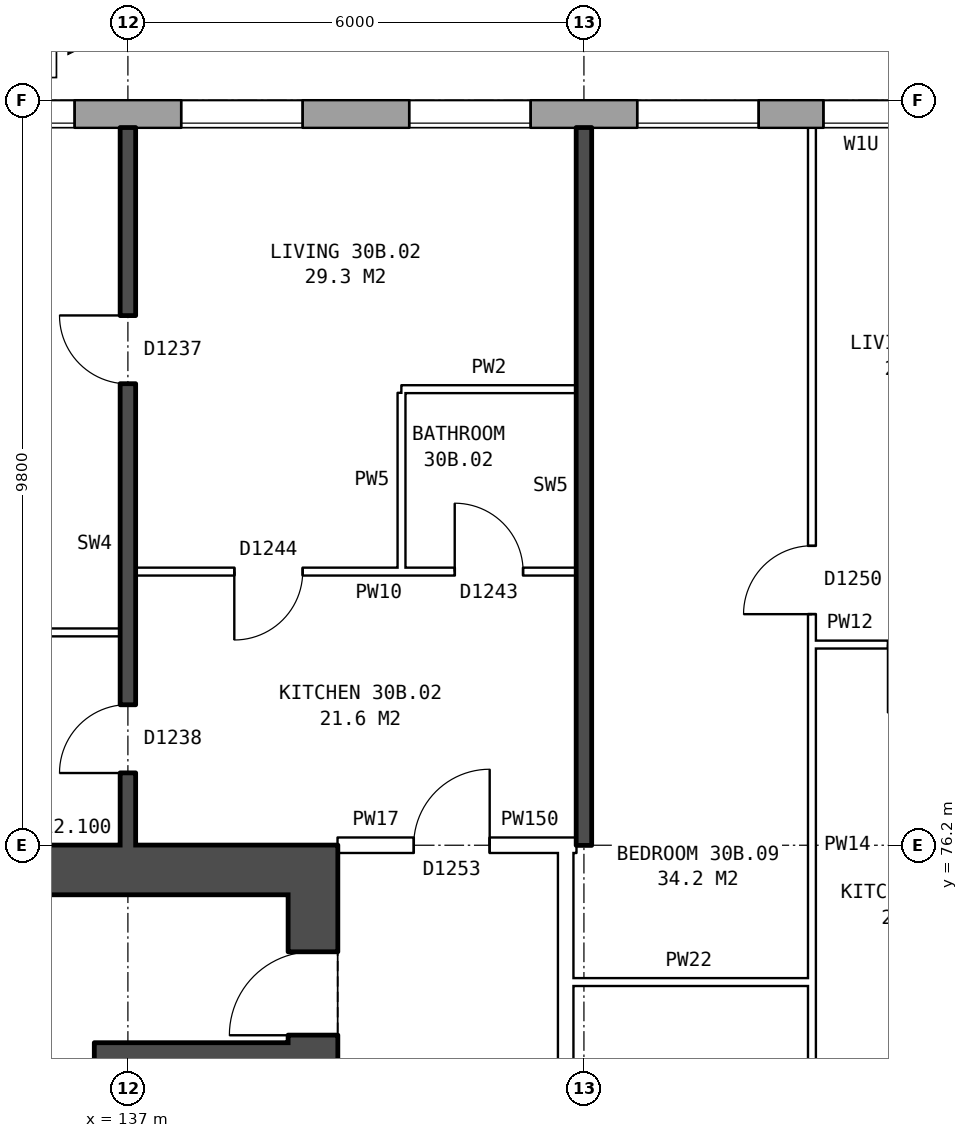
"""IFC4 building model, lengths in metres.
Left out: names, types, materials, properties, quantities, classifications, styles, units other than length and angle.
Written with IfcOpenShell. Run it as: python <this file> out.ifc"""

import sys

from ifc_helpers import new_model, si_unit, direction, frame, frame_2d, origin, place, context, subcontext, project, spatial, rectangle, extrude, element, fill, save


model = new_model("IFC4")
c1 = context("Model", 3, precision=1e-05, world=origin(), true_north=direction((0.0, 1.0)))
c2 = subcontext(c1, "Body", "Model", "MODEL_VIEW")
j1 = project(units=[si_unit("LENGTHUNIT", "METRE"), si_unit("PLANEANGLEUNIT", "RADIAN")], contexts=[c1])
p1 = place(None, origin())
s1 = spatial("IfcSite", under=j1, at=p1, CompositionType="ELEMENT")
p2 = place(p1, origin())
s2 = spatial("IfcBuilding", under=s1, at=p2, CompositionType="ELEMENT")
p3 = place(p2, frame((0.0, 0.0, 108.8)))
s3 = spatial("IfcBuildingStorey", under=s2, at=p3, CompositionType="ELEMENT", Elevation=108.8)
p4 = place(p3, frame((170.925, 85.82, 0.0), z_axis=(0.0, 0.0, 1.0), x_axis=(-1.0, 0.0, 0.0)))
e1 = element("IfcWall", 1, at=p4, inside=s3, PredefinedType="STANDARD", context=c2, shape_type="SweptSolid", body=[
    extrude(rectangle(XDim=36.851, YDim=0.36, at=frame_2d((18.425, 0.0))), origin(), (0.0, 0.0, 1.0), 2.85),
])
p5 = place(p4, frame((1.625, 0.0, 0.8)))
e2 = element("IfcOpeningElement", 2, at=p5, cuts=e1, PredefinedType="OPENING", context=c2, shape_type="SweptSolid", body=[
    extrude(rectangle(XDim=1.6, YDim=1.8, at=frame_2d((0.8, 0.9))), frame((0.0, 0.19, 0.0), z_axis=(0.0, -1.0, 0.0), x_axis=(1.0, 0.0, 0.0)), (0.0, 0.0, 1.0), 0.38),
])
p6 = place(p4, frame((4.625, 0.0, 0.8)))
e3 = element("IfcOpeningElement", 3, at=p6, cuts=e1, PredefinedType="OPENING", context=c2, shape_type="SweptSolid", body=[
    extrude(rectangle(XDim=1.6, YDim=1.8, at=frame_2d((0.8, 0.9))), frame((0.0, 0.19, 0.0), z_axis=(0.0, -1.0, 0.0), x_axis=(1.0, 0.0, 0.0)), (0.0, 0.0, 1.0), 0.38),
])
p7 = place(p4, frame((7.625, 0.0, 0.8)))
e4 = element("IfcOpeningElement", 4, at=p7, cuts=e1, PredefinedType="OPENING", context=c2, shape_type="SweptSolid", body=[
    extrude(rectangle(XDim=1.6, YDim=1.8, at=frame_2d((0.8, 0.9))), frame((0.0, 0.19, 0.0), z_axis=(0.0, -1.0, 0.0), x_axis=(1.0, 0.0, 0.0)), (0.0, 0.0, 1.0), 0.38),
])
p8 = place(p4, frame((10.625, 0.0, 0.8)))
e5 = element("IfcOpeningElement", 5, at=p8, cuts=e1, PredefinedType="OPENING", context=c2, shape_type="SweptSolid", body=[
    extrude(rectangle(XDim=1.6, YDim=1.8, at=frame_2d((0.8, 0.9))), frame((0.0, 0.19, 0.0), z_axis=(0.0, -1.0, 0.0), x_axis=(1.0, 0.0, 0.0)), (0.0, 0.0, 1.0), 0.38),
])
p9 = place(p4, frame((12.525, 0.0, 1.7)))
e6 = element("IfcOpeningElement", 6, at=p9, cuts=e1, PredefinedType="OPENING", context=c2, shape_type="SweptSolid", body=[
    extrude(rectangle(XDim=0.6, YDim=0.9, at=frame_2d((0.3, 0.45))), frame((0.0, 0.19, 0.0), z_axis=(0.0, -1.0, 0.0), x_axis=(1.0, 0.0, 0.0)), (0.0, 0.0, 1.0), 0.38),
])
p10 = place(p4, frame((16.625, 0.0, 0.8)))
e7 = element("IfcOpeningElement", 7, at=p10, cuts=e1, PredefinedType="OPENING", context=c2, shape_type="SweptSolid", body=[
    extrude(rectangle(XDim=1.6, YDim=1.8, at=frame_2d((0.8, 0.9))), frame((0.0, 0.19, 0.0), z_axis=(0.0, -1.0, 0.0), x_axis=(1.0, 0.0, 0.0)), (0.0, 0.0, 1.0), 0.38),
])
p11 = place(p4, frame((19.625, 0.0, 0.8)))
e8 = element("IfcOpeningElement", 8, at=p11, cuts=e1, PredefinedType="OPENING", context=c2, shape_type="SweptSolid", body=[
    extrude(rectangle(XDim=1.6, YDim=1.8, at=frame_2d((0.8, 0.9))), frame((0.0, 0.19, 0.0), z_axis=(0.0, -1.0, 0.0), x_axis=(1.0, 0.0, 0.0)), (0.0, 0.0, 1.0), 0.38),
])
p12 = place(p4, frame((22.125, 0.0, 0.15)))
e9 = element("IfcOpeningElement", 9, at=p12, cuts=e1, PredefinedType="OPENING", context=c2, shape_type="SweptSolid", body=[
    extrude(rectangle(XDim=1.2, YDim=0.9, at=frame_2d((0.6, 0.45))), frame((0.0, 0.19, 0.0), z_axis=(0.0, -1.0, 0.0), x_axis=(1.0, 0.0, 0.0)), (0.0, 0.0, 1.0), 0.38),
])
p13 = place(p4, frame((25.625, 0.0, 0.8)))
e10 = element("IfcOpeningElement", 10, at=p13, cuts=e1, PredefinedType="OPENING", context=c2, shape_type="SweptSolid", body=[
    extrude(rectangle(XDim=1.6, YDim=1.8, at=frame_2d((0.8, 0.9))), frame((0.0, 0.19, 0.0), z_axis=(0.0, -1.0, 0.0), x_axis=(1.0, 0.0, 0.0)), (0.0, 0.0, 1.0), 0.38),
])
p14 = place(p4, frame((28.625, 0.0, 0.8)))
e11 = element("IfcOpeningElement", 11, at=p14, cuts=e1, PredefinedType="OPENING", context=c2, shape_type="SweptSolid", body=[
    extrude(rectangle(XDim=1.6, YDim=1.8, at=frame_2d((0.8, 0.9))), frame((0.0, 0.19, 0.0), z_axis=(0.0, -1.0, 0.0), x_axis=(1.0, 0.0, 0.0)), (0.0, 0.0, 1.0), 0.38),
])
p15 = place(p4, frame((31.625, 0.0, 0.8)))
e12 = element("IfcOpeningElement", 12, at=p15, cuts=e1, PredefinedType="OPENING", context=c2, shape_type="SweptSolid", body=[
    extrude(rectangle(XDim=1.6, YDim=1.8, at=frame_2d((0.8, 0.9))), frame((0.0, 0.19, 0.0), z_axis=(0.0, -1.0, 0.0), x_axis=(1.0, 0.0, 0.0)), (0.0, 0.0, 1.0), 0.38),
])
p16 = place(p4, frame((34.625, 0.0, 0.8)))
e13 = element("IfcOpeningElement", 13, at=p16, cuts=e1, PredefinedType="OPENING", context=c2, shape_type="SweptSolid", body=[
    extrude(rectangle(XDim=1.6, YDim=1.8, at=frame_2d((0.8, 0.9))), frame((0.0, 0.19, 0.0), z_axis=(0.0, -1.0, 0.0), x_axis=(1.0, 0.0, 0.0)), (0.0, 0.0, 1.0), 0.38),
])
p17 = place(p4, frame((14.275, 0.0, 0.8)))
e14 = element("IfcOpeningElement", 14, at=p17, cuts=e1, PredefinedType="OPENING", context=c2, shape_type="SweptSolid", body=[
    extrude(rectangle(XDim=1.4, YDim=0.9, at=frame_2d((0.7, 0.45))), frame((0.0, 0.19, 0.0), z_axis=(0.0, -1.0, 0.0), x_axis=(1.0, 0.0, 0.0)), (0.0, 0.0, 1.0), 0.38),
])
p18 = place(p4, frame((23.775, 0.0, 1.65)))
e15 = element("IfcOpeningElement", 15, at=p18, cuts=e1, PredefinedType="OPENING", context=c2, shape_type="SweptSolid", body=[
    extrude(rectangle(XDim=1.0, YDim=0.9, at=frame_2d((0.5, 0.45))), frame((0.0, 0.19, 0.0), z_axis=(0.0, -1.0, 0.0), x_axis=(1.0, 0.0, 0.0)), (0.0, 0.0, 1.0), 0.38),
])
p19 = place(p3, frame((139.435, 64.45, 0.0), z_axis=(0.0, 0.0, 1.0), x_axis=(0.0, 1.0, 0.0)))
e16 = element("IfcWall", 16, at=p19, inside=s3, PredefinedType="SHEAR", context=c2, shape_type="SweptSolid", body=[
    extrude(rectangle(XDim=11.1, YDim=0.65, at=frame_2d((5.55, 0.0))), origin(), (0.0, 0.0, 1.0), 2.85),
])
p20 = place(p19, frame((0.675, 0.0, 0.0)))
e17 = element("IfcOpeningElement", 17, at=p20, cuts=e16, PredefinedType="OPENING", context=c2, shape_type="SweptSolid", body=[
    extrude(rectangle(XDim=1.1, YDim=2.1, at=frame_2d((0.55, 1.05))), frame((0.0, 0.335, 0.0), z_axis=(0.0, -1.0, 0.0), x_axis=(1.0, 0.0, 0.0)), (0.0, 0.0, 1.0), 0.67),
])
p21 = place(p19, frame((9.25, 0.0, 0.0)))
e18 = element("IfcOpeningElement", 18, at=p21, cuts=e16, PredefinedType="OPENING", context=c2, shape_type="SweptSolid", body=[
    extrude(rectangle(XDim=1.1, YDim=2.1, at=frame_2d((0.55, 1.05))), frame((0.0, 0.335, 0.0), z_axis=(0.0, -1.0, 0.0), x_axis=(1.0, 0.0, 0.0)), (0.0, 0.0, 1.0), 0.67),
])
p22 = place(p19, frame((7.475, 0.0, 0.0)))
e19 = element("IfcOpeningElement", 19, at=p22, cuts=e16, PredefinedType="OPENING", context=c2, shape_type="SweptSolid", body=[
    extrude(rectangle(XDim=0.85, YDim=2.1, at=frame_2d((0.425, 1.05))), frame((0.0, 0.335, 0.0), z_axis=(0.0, -1.0, 0.0), x_axis=(1.0, 0.0, 0.0)), (0.0, 0.0, 1.0), 0.67),
])
p23 = place(p3, frame((139.76, 75.875, 0.0), z_axis=(0.0, 0.0, 1.0), x_axis=(-1.0, 0.0, 0.0)))
e20 = element("IfcWall", 20, at=p23, inside=s3, PredefinedType="SHEAR", context=c2, shape_type="SweptSolid", body=[
    extrude(rectangle(XDim=8.4, YDim=0.65, at=frame_2d((4.2, 0.0))), origin(), (0.0, 0.0, 1.0), 2.85),
])
p24 = place(p3, frame((139.11, 73.45, 0.0), z_axis=(0.0, 0.0, 1.0), x_axis=(-1.0, 0.0, 0.0)))
e21 = element("IfcWall", 21, at=p24, inside=s3, PredefinedType="SHEAR", context=c2, shape_type="SweptSolid", body=[
    extrude(rectangle(XDim=2.25, YDim=0.3, at=frame_2d((1.125, 0.0))), origin(), (0.0, 0.0, 1.0), 2.85),
])
p25 = place(p3, frame((136.71, 71.4, 0.0), z_axis=(0.0, 0.0, 1.0), x_axis=(0.0, 1.0, 0.0)))
e22 = element("IfcWall", 22, at=p25, inside=s3, PredefinedType="SHEAR", context=c2, shape_type="SweptSolid", body=[
    extrude(rectangle(XDim=2.2, YDim=0.3, at=frame_2d((1.1, 0.0))), origin(), (0.0, 0.0, 1.0), 2.85),
])
p26 = place(p3, frame((142.76, 63.9, 0.0), z_axis=(0.0, 0.0, 1.0), x_axis=(0.0, 1.0, 0.0)))
e23 = element("IfcWall", 23, at=p26, inside=s3, PredefinedType="PARTITIONING", context=c2, shape_type="SweptSolid", body=[
    extrude(rectangle(XDim=12.2, YDim=0.2, at=frame_2d((6.1, 0.0))), origin(), (0.0, 0.0, 1.0), 2.85),
])
p27 = place(p26, frame((5.1, 0.0, 0.0)))
e24 = element("IfcOpeningElement", 24, at=p27, cuts=e23, PredefinedType="OPENING", context=c2, shape_type="SweptSolid", body=[
    extrude(rectangle(XDim=2.0, YDim=2.1, at=frame_2d((1.0, 1.05))), frame((0.0, 0.11, 0.0), z_axis=(0.0, -1.0, 0.0), x_axis=(1.0, 0.0, 0.0)), (0.0, 0.0, 1.0), 0.22),
])
p28 = place(p3, frame((142.76, 74.4, 0.0), z_axis=(0.0, 0.0, 1.0), x_axis=(1.0, 0.0, 0.0)))
e25 = element("IfcWall", 25, at=p28, inside=s3, PredefinedType="PARTITIONING", context=c2, shape_type="SweptSolid", body=[
    extrude(rectangle(XDim=3.24, YDim=0.1, at=frame_2d((1.62, 0.0))), origin(), (0.0, 0.0, 1.0), 2.85),
])
p29 = place(p3, frame((139.76, 76.2, 0.0), z_axis=(0.0, 0.0, 1.0), x_axis=(1.0, 0.0, 0.0)))
e26 = element("IfcWall", 26, at=p29, inside=s3, PredefinedType="PARTITIONING", context=c2, shape_type="SweptSolid", body=[
    extrude(rectangle(XDim=3.0, YDim=0.2, at=frame_2d((1.5, 0.0))), origin(), (0.0, 0.0, 1.0), 2.85),
])
p30 = place(p29, frame((1.0, 0.0, 0.0)))
e27 = element("IfcOpeningElement", 27, at=p30, cuts=e26, PredefinedType="OPENING", context=c2, shape_type="SweptSolid", body=[
    extrude(rectangle(XDim=1.0, YDim=2.1, at=frame_2d((0.5, 1.05))), frame((0.0, 0.11, 0.0), z_axis=(0.0, -1.0, 0.0), x_axis=(1.0, 0.0, 0.0)), (0.0, 0.0, 1.0), 0.22),
])
p31 = place(p3, frame((142.76, 76.2, 0.0), z_axis=(0.0, 0.0, 1.0), x_axis=(1.0, 0.0, 0.0)))
e28 = element("IfcWall", 28, at=p31, inside=s3, PredefinedType="PARTITIONING", context=c2, shape_type="SweptSolid", body=[
    extrude(rectangle(XDim=0.14, YDim=0.2, at=frame_2d((0.07, 0.0))), origin(), (0.0, 0.0, 1.0), 2.85),
])
p32 = place(p3, frame((146.0, 78.84, 0.0), z_axis=(0.0, 0.0, 1.0), x_axis=(1.0, 0.0, 0.0)))
e29 = element("IfcWall", 29, at=p32, inside=s3, PredefinedType="PARTITIONING", context=c2, shape_type="SweptSolid", body=[
    extrude(rectangle(XDim=2.9, YDim=0.1, at=frame_2d((1.45, 0.0))), origin(), (0.0, 0.0, 1.0), 2.85),
])
p33 = place(p32, frame((1.0, 0.0, 0.0)))
e30 = element("IfcOpeningElement", 30, at=p33, cuts=e29, PredefinedType="OPENING", context=c2, shape_type="SweptSolid", body=[
    extrude(rectangle(XDim=0.9, YDim=2.1, at=frame_2d((0.45, 1.05))), frame((0.0, 0.06, 0.0), z_axis=(0.0, -1.0, 0.0), x_axis=(1.0, 0.0, 0.0)), (0.0, 0.0, 1.0), 0.12),
])
p34 = place(p3, frame((131.36, 79.0, 0.0), z_axis=(0.0, 0.0, 1.0), x_axis=(1.0, 0.0, 0.0)))
e31 = element("IfcWall", 31, at=p34, inside=s3, PredefinedType="PARTITIONING", context=c2, shape_type="SweptSolid", body=[
    extrude(rectangle(XDim=5.54, YDim=0.1, at=frame_2d((2.77, 0.0))), origin(), (0.0, 0.0, 1.0), 2.85),
])
p35 = place(p3, frame((137.1, 79.8, 0.0), z_axis=(0.0, 0.0, 1.0), x_axis=(1.0, 0.0, 0.0)))
e32 = element("IfcWall", 32, at=p35, inside=s3, PredefinedType="PARTITIONING", context=c2, shape_type="SweptSolid", body=[
    extrude(rectangle(XDim=5.8, YDim=0.1, at=frame_2d((2.9, 0.0))), origin(), (0.0, 0.0, 1.0), 2.85),
])
p36 = place(p35, frame((1.3, 0.0, 0.0)))
e33 = element("IfcOpeningElement", 33, at=p36, cuts=e32, PredefinedType="OPENING", context=c2, shape_type="SweptSolid", body=[
    extrude(rectangle(XDim=0.9, YDim=2.1, at=frame_2d((0.45, 1.05))), frame((0.0, 0.06, 0.0), z_axis=(0.0, -1.0, 0.0), x_axis=(1.0, 0.0, 0.0)), (0.0, 0.0, 1.0), 0.12),
])
p37 = place(p35, frame((4.2, 0.0, 0.0)))
e34 = element("IfcOpeningElement", 34, at=p37, cuts=e32, PredefinedType="OPENING", context=c2, shape_type="SweptSolid", body=[
    extrude(rectangle(XDim=0.9, YDim=2.1, at=frame_2d((0.45, 1.05))), frame((0.0, 0.06, 0.0), z_axis=(0.0, -1.0, 0.0), x_axis=(1.0, 0.0, 0.0)), (0.0, 0.0, 1.0), 0.12),
])
p38 = place(p3, frame((140.6, 82.2, 0.0), z_axis=(0.0, 0.0, 1.0), x_axis=(1.0, 0.0, 0.0)))
e35 = element("IfcWall", 35, at=p38, inside=s3, PredefinedType="PARTITIONING", context=c2, shape_type="SweptSolid", body=[
    extrude(rectangle(XDim=2.3, YDim=0.1, at=frame_2d((1.15, 0.0))), origin(), (0.0, 0.0, 1.0), 2.85),
])
p39 = place(p3, frame((137.0, 76.2, 0.0), z_axis=(0.0, 0.0, 1.0), x_axis=(0.0, 1.0, 0.0)))
e36 = element("IfcWall", 36, at=p39, inside=s3, PredefinedType="SOLIDWALL", context=c2, shape_type="SweptSolid", body=[
    extrude(rectangle(XDim=9.44, YDim=0.2, at=frame_2d((4.72, 0.0))), origin(), (0.0, 0.0, 1.0), 2.85),
])
p40 = place(p39, frame((6.07, 0.0, 0.0)))
e37 = element("IfcOpeningElement", 37, at=p40, cuts=e36, PredefinedType="OPENING", context=c2, shape_type="SweptSolid", body=[
    extrude(rectangle(XDim=0.9, YDim=2.1, at=frame_2d((0.45, 1.05))), frame((0.0, 0.11, 0.0), z_axis=(0.0, -1.0, 0.0), x_axis=(1.0, 0.0, 0.0)), (0.0, 0.0, 1.0), 0.22),
])
p41 = place(p39, frame((0.95, 0.0, 0.0)))
e38 = element("IfcOpeningElement", 38, at=p41, cuts=e36, PredefinedType="OPENING", context=c2, shape_type="SweptSolid", body=[
    extrude(rectangle(XDim=0.9, YDim=2.1, at=frame_2d((0.45, 1.05))), frame((0.0, 0.11, 0.0), z_axis=(0.0, -1.0, 0.0), x_axis=(1.0, 0.0, 0.0)), (0.0, 0.0, 1.0), 0.22),
])
p42 = place(p3, frame((140.6, 79.85, 0.0), z_axis=(0.0, 0.0, 1.0), x_axis=(0.0, 1.0, 0.0)))
e39 = element("IfcWall", 39, at=p42, inside=s3, PredefinedType="PARTITIONING", context=c2, shape_type="SweptSolid", body=[
    extrude(rectangle(XDim=2.3, YDim=0.1, at=frame_2d((1.15, 0.0))), origin(), (0.0, 0.0, 1.0), 2.85),
])
p43 = place(p3, frame((143.0, 76.2, 0.0), z_axis=(0.0, 0.0, 1.0), x_axis=(0.0, 1.0, 0.0)))
e40 = element("IfcWall", 40, at=p43, inside=s3, PredefinedType="SOLIDWALL", context=c2, shape_type="SweptSolid", body=[
    extrude(rectangle(XDim=9.44, YDim=0.2, at=frame_2d((4.72, 0.0))), origin(), (0.0, 0.0, 1.0), 2.85),
])
p44 = place(p3, frame((146.0, 71.3, 0.0), z_axis=(0.0, 0.0, 1.0), x_axis=(0.0, 1.0, 0.0)))
e41 = element("IfcWall", 41, at=p44, inside=s3, PredefinedType="PARTITIONING", context=c2, shape_type="SweptSolid", body=[
    extrude(rectangle(XDim=14.34, YDim=0.1, at=frame_2d((7.17, 0.0))), origin(), (0.0, 0.0, 1.0), 2.85),
])
p45 = place(p44, frame((7.94, 0.0, 0.0)))
e42 = element("IfcOpeningElement", 42, at=p45, cuts=e41, PredefinedType="OPENING", context=c2, shape_type="SweptSolid", body=[
    extrude(rectangle(XDim=0.9, YDim=2.1, at=frame_2d((0.45, 1.05))), frame((0.0, 0.06, 0.0), z_axis=(0.0, -1.0, 0.0), x_axis=(1.0, 0.0, 0.0)), (0.0, 0.0, 1.0), 0.12),
])
p46 = place(p44, frame((0.4, 0.0, 0.0)))
e43 = element("IfcOpeningElement", 43, at=p46, cuts=e41, PredefinedType="OPENING", context=c2, shape_type="SweptSolid", body=[
    extrude(rectangle(XDim=0.9, YDim=2.1, at=frame_2d((0.45, 1.05))), frame((0.0, 0.06, 0.0), z_axis=(0.0, -1.0, 0.0), x_axis=(1.0, 0.0, 0.0)), (0.0, 0.0, 1.0), 0.12),
])
p47 = place(p13, origin())
e44 = element("IfcWindow", 44, at=p47, inside=s3, PartitioningType="SINGLE_PANEL", PredefinedType="WINDOW", context=c2, shape_type="SweptSolid", body=[
    extrude(rectangle(XDim=1.6, YDim=1.8, at=frame_2d((0.8, 0.9))), frame((0.0, 0.15, 0.0), z_axis=(0.0, -1.0, 0.0), x_axis=(1.0, 0.0, 0.0)), (0.0, 0.0, 1.0), 0.06),
])
fill(e10, e44)
p48 = place(p14, origin())
e45 = element("IfcWindow", 45, at=p48, inside=s3, PartitioningType="SINGLE_PANEL", PredefinedType="WINDOW", context=c2, shape_type="SweptSolid", body=[
    extrude(rectangle(XDim=1.6, YDim=1.8, at=frame_2d((0.8, 0.9))), frame((0.0, 0.15, 0.0), z_axis=(0.0, -1.0, 0.0), x_axis=(1.0, 0.0, 0.0)), (0.0, 0.0, 1.0), 0.06),
])
fill(e11, e45)
p49 = place(p15, origin())
e46 = element("IfcWindow", 46, at=p49, inside=s3, PartitioningType="SINGLE_PANEL", PredefinedType="WINDOW", context=c2, shape_type="SweptSolid", body=[
    extrude(rectangle(XDim=1.6, YDim=1.8, at=frame_2d((0.8, 0.9))), frame((0.0, 0.15, 0.0), z_axis=(0.0, -1.0, 0.0), x_axis=(1.0, 0.0, 0.0)), (0.0, 0.0, 1.0), 0.06),
])
fill(e12, e46)
p50 = place(p16, origin())
e47 = element("IfcWindow", 47, at=p50, inside=s3, PartitioningType="SINGLE_PANEL", PredefinedType="WINDOW", context=c2, shape_type="SweptSolid", body=[
    extrude(rectangle(XDim=1.6, YDim=1.8, at=frame_2d((0.8, 0.9))), frame((0.0, 0.15, 0.0), z_axis=(0.0, -1.0, 0.0), x_axis=(1.0, 0.0, 0.0)), (0.0, 0.0, 1.0), 0.06),
])
fill(e13, e47)
p51 = place(p21, origin())
e48 = element("IfcDoor", 48, at=p51, inside=s3, OperationType="SINGLE_SWING_LEFT", PredefinedType="DOOR", context=c2, shape_type="SweptSolid", body=[
    extrude(rectangle(XDim=1.1, YDim=2.1, at=frame_2d((0.55, 1.05))), frame((0.0, 0.31, 0.0), z_axis=(0.0, -1.0, 0.0), x_axis=(1.0, 0.0, 0.0)), (0.0, 0.0, 1.0), 0.05),
])
fill(e18, e48)
p52 = place(p40, origin())
e49 = element("IfcDoor", 49, at=p52, inside=s3, OperationType="SINGLE_SWING_RIGHT", PredefinedType="DOOR", context=c2, shape_type="SweptSolid", body=[
    extrude(rectangle(XDim=0.9, YDim=2.1, at=frame_2d((0.45, 1.05))), frame((0.0, 0.025, 0.0), z_axis=(0.0, -1.0, 0.0), x_axis=(1.0, 0.0, 0.0)), (0.0, 0.0, 1.0), 0.05),
])
fill(e37, e49)
p53 = place(p41, origin())
e50 = element("IfcDoor", 50, at=p53, inside=s3, OperationType="SINGLE_SWING_LEFT", PredefinedType="DOOR", context=c2, shape_type="SweptSolid", body=[
    extrude(rectangle(XDim=0.9, YDim=2.1, at=frame_2d((0.45, 1.05))), frame((0.0, 0.025, 0.0), z_axis=(0.0, -1.0, 0.0), x_axis=(1.0, 0.0, 0.0)), (0.0, 0.0, 1.0), 0.05),
])
fill(e38, e50)
p54 = place(p30, origin())
e51 = element("IfcDoor", 51, at=p54, inside=s3, OperationType="SINGLE_SWING_RIGHT", PredefinedType="DOOR", context=c2, shape_type="SweptSolid", body=[
    extrude(rectangle(XDim=1.0, YDim=2.1, at=frame_2d((0.5, 1.05))), frame((0.0, 0.025, 0.0), z_axis=(0.0, -1.0, 0.0), x_axis=(1.0, 0.0, 0.0)), (0.0, 0.0, 1.0), 0.05),
])
fill(e27, e51)
p55 = place(p36, frame((0.9, 0.0, 0.0), z_axis=(0.0, 0.0, 1.0), x_axis=(-1.0, 0.0, 0.0)))
e52 = element("IfcDoor", 52, at=p55, inside=s3, OperationType="SINGLE_SWING_RIGHT", PredefinedType="DOOR", context=c2, shape_type="SweptSolid", body=[
    extrude(rectangle(XDim=0.9, YDim=2.1, at=frame_2d((0.45, 1.05))), frame((0.0, 0.025, 0.0), z_axis=(0.0, -1.0, 0.0), x_axis=(1.0, 0.0, 0.0)), (0.0, 0.0, 1.0), 0.05),
])
fill(e33, e52)
p56 = place(p37, origin())
e53 = element("IfcDoor", 53, at=p56, inside=s3, OperationType="SINGLE_SWING_LEFT", PredefinedType="DOOR", context=c2, shape_type="SweptSolid", body=[
    extrude(rectangle(XDim=0.9, YDim=2.1, at=frame_2d((0.45, 1.05))), frame((0.0, 0.025, 0.0), z_axis=(0.0, -1.0, 0.0), x_axis=(1.0, 0.0, 0.0)), (0.0, 0.0, 1.0), 0.05),
])
fill(e34, e53)
p57 = place(p45, origin())
e54 = element("IfcDoor", 54, at=p57, inside=s3, OperationType="SINGLE_SWING_LEFT", PredefinedType="DOOR", context=c2, shape_type="SweptSolid", body=[
    extrude(rectangle(XDim=0.9, YDim=2.1, at=frame_2d((0.45, 1.05))), frame((0.0, 0.025, 0.0), z_axis=(0.0, -1.0, 0.0), x_axis=(1.0, 0.0, 0.0)), (0.0, 0.0, 1.0), 0.05),
])
fill(e42, e54)
p58 = place(p18, origin())
e55 = element("IfcWindow", 55, at=p58, inside=s3, PartitioningType="SINGLE_PANEL", PredefinedType="WINDOW", context=c2, shape_type="SweptSolid", body=[
    extrude(rectangle(XDim=1.0, YDim=0.9, at=frame_2d((0.5, 0.45))), frame((0.0, 0.15, 0.0), z_axis=(0.0, -1.0, 0.0), x_axis=(1.0, 0.0, 0.0)), (0.0, 0.0, 1.0), 0.06),
])
fill(e15, e55)
save(model, sys.argv[1])
